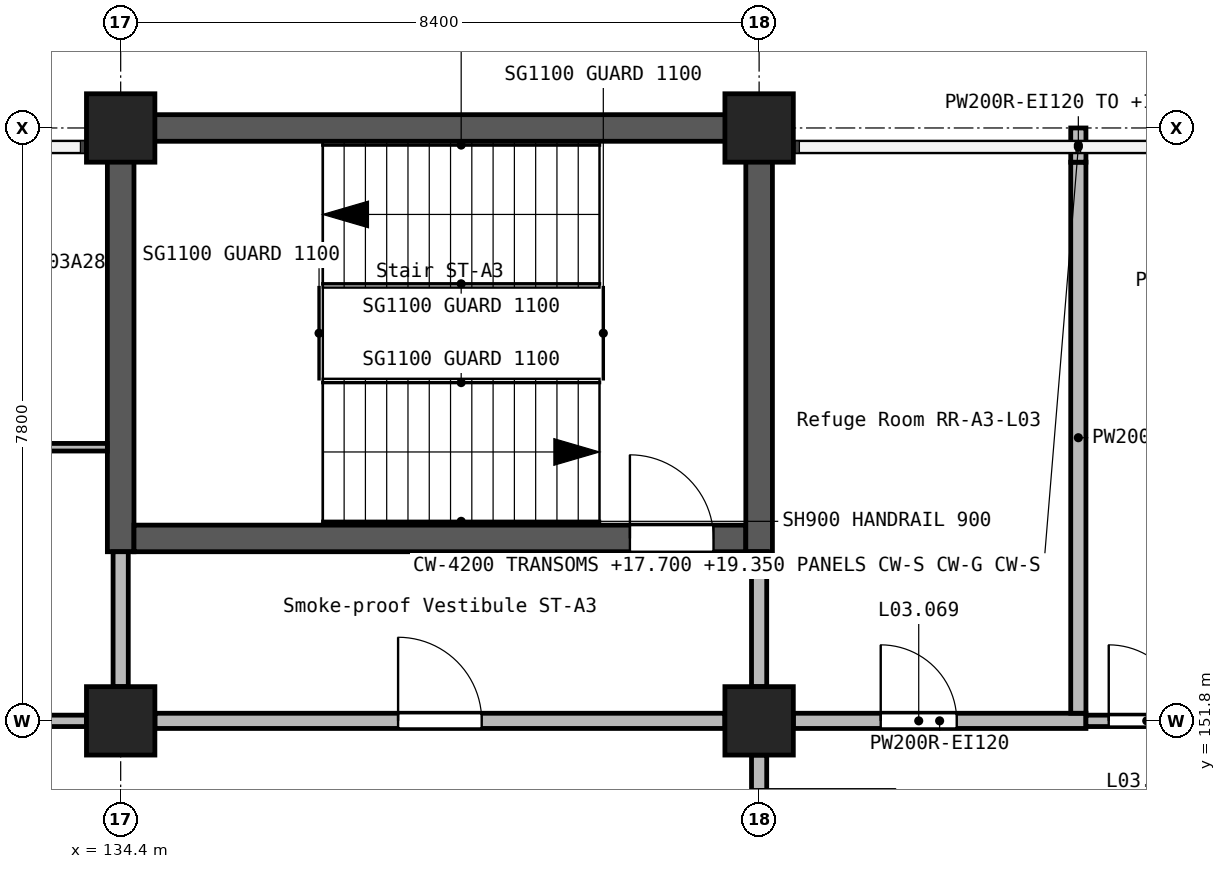
"""IFC4 building model, lengths in metres.
Left out: names, types, materials, properties, quantities, classifications, styles, units other than length and angle.
Written with IfcOpenShell. Run it as: python <this file> out.ifc"""

import sys

from ifc_helpers import new_model, si_unit, direction, frame, frame_2d, origin, origin_2d, place, context, subcontext, project, spatial, rectangle, extrude, element, fill, save


model = new_model("IFC4")
c1 = context("Model", 3, precision=1e-05, world=origin(), true_north=direction((0.0, 1.0)))
c2 = subcontext(c1, "Body", "Model", "MODEL_VIEW")
j1 = project(units=[si_unit("LENGTHUNIT", "METRE"), si_unit("PLANEANGLEUNIT", "RADIAN")], contexts=[c1])
p1 = place(None, origin())
s1 = spatial("IfcSite", under=j1, at=p1, CompositionType="ELEMENT")
p2 = place(p1, origin())
s2 = spatial("IfcBuilding", under=s1, at=p2, CompositionType="ELEMENT")
p3 = place(p2, frame((0.0, 0.0, 16.8)))
s3 = spatial("IfcBuildingStorey", under=s2, at=p3, CompositionType="ELEMENT", Elevation=16.8)
for number, where, z_axis, x_axis in (
    (1, (134.4, 151.8, 0.0), (0.0, 0.0, 1.0), (1.0, 0.0, 0.0)),
    (2, (134.4, 159.6, 0.0), (0.0, 0.0, 1.0), (1.0, 0.0, 0.0)),
    (3, (142.8, 151.8, 0.0), (0.0, 0.0, 1.0), (1.0, 0.0, 0.0)),
    (4, (142.8, 159.6, 0.0), (0.0, 0.0, 1.0), (1.0, 0.0, 0.0)),
):
    element("IfcColumn", number, at=place(p3, frame(where, z_axis=z_axis, x_axis=x_axis)), inside=s3, PredefinedType="COLUMN", context=c2, shape_type="SweptSolid", body=[
        extrude(rectangle(XDim=0.9, YDim=0.9, at=origin_2d()), origin(), (0.0, 0.0, 1.0), 4.2),
    ])
p4 = place(p3, frame((134.225, 159.6, 0.0), z_axis=(0.0, 0.0, 1.0), x_axis=(1.0, 0.0, 0.0)))
e5 = element("IfcWall", 5, at=p4, inside=s3, PredefinedType="SHEAR", context=c2, shape_type="SweptSolid", body=[
    extrude(rectangle(XDim=8.4, YDim=0.35, at=frame_2d((4.2, 0.0))), origin(), (0.0, 0.0, 1.0), 4.2),
])
p5 = place(p3, frame((134.4, 154.025, 0.0), z_axis=(0.0, 0.0, 1.0), x_axis=(0.0, 1.0, 0.0)))
e6 = element("IfcWall", 6, at=p5, inside=s3, PredefinedType="SHEAR", context=c2, shape_type="SweptSolid", body=[
    extrude(rectangle(XDim=5.4, YDim=0.35, at=frame_2d((2.7, 0.0))), origin(), (0.0, 0.0, 1.0), 4.2),
])
p6 = place(p3, frame((134.575, 154.2, 0.0), z_axis=(0.0, 0.0, 1.0), x_axis=(1.0, 0.0, 0.0)))
e7 = element("IfcWall", 7, at=p6, inside=s3, PredefinedType="SHEAR", context=c2, shape_type="SweptSolid", body=[
    extrude(rectangle(XDim=8.05, YDim=0.35, at=frame_2d((4.025, 0.0))), origin(), (0.0, 0.0, 1.0), 4.2),
])
p7 = place(p6, frame((6.525, 0.0, 0.0)))
e8 = element("IfcOpeningElement", 8, at=p7, cuts=e7, PredefinedType="OPENING", context=c2, shape_type="SweptSolid", body=[
    extrude(rectangle(XDim=1.1, YDim=2.1, at=frame_2d((0.55, 1.05))), frame((0.0, 0.185, 0.0), z_axis=(0.0, -1.0, 0.0), x_axis=(1.0, 0.0, 0.0)), (0.0, 0.0, 1.0), 0.37),
])
p8 = place(p3, frame((142.8, 154.025, 0.0), z_axis=(0.0, 0.0, 1.0), x_axis=(0.0, 1.0, 0.0)))
e9 = element("IfcWall", 9, at=p8, inside=s3, PredefinedType="SHEAR", context=c2, shape_type="SweptSolid", body=[
    extrude(rectangle(XDim=5.75, YDim=0.35, at=frame_2d((2.875, 0.0))), origin(), (0.0, 0.0, 1.0), 4.2),
])
p9 = place(p3, frame((142.8, 154.025, 0.0), z_axis=(0.0, 0.0, 1.0), x_axis=(0.0, -1.0, 0.0)))
e10 = element("IfcWall", 10, at=p9, inside=s3, PredefinedType="SOLIDWALL", context=c2, shape_type="SweptSolid", body=[
    extrude(rectangle(XDim=1.775, YDim=0.2, at=frame_2d((0.887, 0.0))), origin(), (0.0, 0.0, 1.0), 3.9),
])
p10 = place(p3, frame((142.8, 151.35, 0.0), z_axis=(0.0, 0.0, 1.0), x_axis=(0.0, -1.0, 0.0)))
e11 = element("IfcWall", 11, at=p10, inside=s3, PredefinedType="SOLIDWALL", context=c2, shape_type="SweptSolid", body=[
    extrude(rectangle(XDim=2.7, YDim=0.2, at=frame_2d((1.35, 0.0))), origin(), (0.0, 0.0, 1.0), 3.9),
])
p11 = place(p10, frame((0.45, 0.0, 0.0)))
e12 = element("IfcOpeningElement", 12, at=p11, cuts=e11, PredefinedType="OPENING", context=c2, shape_type="SweptSolid", body=[
    extrude(rectangle(XDim=1.8, YDim=2.1, at=frame_2d((0.9, 1.05))), frame((0.0, 0.11, 0.0), z_axis=(0.0, -1.0, 0.0), x_axis=(1.0, 0.0, 0.0)), (0.0, 0.0, 1.0), 0.22),
])
p12 = place(p3, frame((134.85, 151.8, 0.0), z_axis=(0.0, 0.0, 1.0), x_axis=(1.0, 0.0, 0.0)))
e13 = element("IfcWall", 13, at=p12, inside=s3, PredefinedType="SOLIDWALL", context=c2, shape_type="SweptSolid", body=[
    extrude(rectangle(XDim=7.5, YDim=0.2, at=frame_2d((3.75, 0.0))), origin(), (0.0, 0.0, 1.0), 3.9),
])
p13 = place(p12, frame((3.2, 0.0, 0.0)))
e14 = element("IfcOpeningElement", 14, at=p13, cuts=e13, PredefinedType="OPENING", context=c2, shape_type="SweptSolid", body=[
    extrude(rectangle(XDim=1.1, YDim=2.1, at=frame_2d((0.55, 1.05))), frame((0.0, 0.11, 0.0), z_axis=(0.0, -1.0, 0.0), x_axis=(1.0, 0.0, 0.0)), (0.0, 0.0, 1.0), 0.22),
])
p14 = place(p3, frame((143.25, 151.8, 0.0), z_axis=(0.0, 0.0, 1.0), x_axis=(1.0, 0.0, 0.0)))
e15 = element("IfcWall", 15, at=p14, inside=s3, PredefinedType="SOLIDWALL", context=c2, shape_type="SweptSolid", body=[
    extrude(rectangle(XDim=3.85, YDim=0.2, at=frame_2d((1.925, 0.0))), origin(), (0.0, 0.0, 1.0), 3.9),
])
p15 = place(p14, frame((1.15, 0.0, 0.0)))
e16 = element("IfcOpeningElement", 16, at=p15, cuts=e15, PredefinedType="OPENING", context=c2, shape_type="SweptSolid", body=[
    extrude(rectangle(XDim=1.0, YDim=2.1, at=frame_2d((0.5, 1.05))), frame((0.0, 0.11, 0.0), z_axis=(0.0, -1.0, 0.0), x_axis=(1.0, 0.0, 0.0)), (0.0, 0.0, 1.0), 0.22),
])
p16 = place(p3, frame((147.0, 151.9, 0.0), z_axis=(0.0, 0.0, 1.0), x_axis=(0.0, 1.0, 0.0)))
e17 = element("IfcWall", 17, at=p16, inside=s3, PredefinedType="SOLIDWALL", context=c2, shape_type="SweptSolid", body=[
    extrude(rectangle(XDim=7.25, YDim=0.2, at=frame_2d((3.625, 0.0))), origin(), (0.0, 0.0, 1.0), 3.9),
])
p17 = place(p3, frame((147.0, 159.15, 0.0), z_axis=(0.0, 0.0, 1.0), x_axis=(0.0, 1.0, 0.0)))
e18 = element("IfcWall", 18, at=p17, inside=s3, PredefinedType="SOLIDWALL", context=c2, shape_type="SweptSolid", body=[
    extrude(rectangle(XDim=0.45, YDim=0.2, at=frame_2d((0.225, 0.0))), origin(), (0.0, 0.0, 1.0), 3.08),
])
p18 = place(p3, frame((134.4, 152.25, 0.0), z_axis=(0.0, 0.0, 1.0), x_axis=(0.0, 1.0, 0.0)))
e19 = element("IfcWall", 19, at=p18, inside=s3, PredefinedType="SOLIDWALL", context=c2, shape_type="SweptSolid", body=[
    extrude(rectangle(XDim=1.775, YDim=0.2, at=frame_2d((0.887, 0.0))), origin(), (0.0, 0.0, 1.0), 3.9),
])
p19 = place(p3, frame((133.95, 151.8, 0.0), z_axis=(0.0, 0.0, 1.0), x_axis=(-1.0, 0.0, 0.0)))
e20 = element("IfcWall", 20, at=p19, inside=s3, PredefinedType="PARTITIONING", context=c2, shape_type="SweptSolid", body=[
    extrude(rectangle(XDim=7.5, YDim=0.15, at=frame_2d((3.75, 0.0))), origin(), (0.0, 0.0, 1.0), 3.9),
])
p20 = place(p19, frame((6.25, 0.0, 0.0)))
e21 = element("IfcOpeningElement", 21, at=p20, cuts=e20, PredefinedType="OPENING", context=c2, shape_type="SweptSolid", body=[
    extrude(rectangle(XDim=1.0, YDim=2.1, at=frame_2d((0.5, 1.05))), frame((0.0, 0.085, 0.0), z_axis=(0.0, -1.0, 0.0), x_axis=(1.0, 0.0, 0.0)), (0.0, 0.0, 1.0), 0.17),
])
p21 = place(p19, frame((2.25, 0.0, 0.0)))
e22 = element("IfcOpeningElement", 22, at=p21, cuts=e20, PredefinedType="OPENING", context=c2, shape_type="SweptSolid", body=[
    extrude(rectangle(XDim=0.9, YDim=2.1, at=frame_2d((0.45, 1.05))), frame((0.0, 0.085, 0.0), z_axis=(0.0, -1.0, 0.0), x_axis=(1.0, 0.0, 0.0)), (0.0, 0.0, 1.0), 0.17),
])
p22 = place(p3, frame((147.1, 151.8, 0.0), z_axis=(0.0, 0.0, 1.0), x_axis=(1.0, 0.0, 0.0)))
e23 = element("IfcWall", 23, at=p22, inside=s3, PredefinedType="PARTITIONING", context=c2, shape_type="SweptSolid", body=[
    extrude(rectangle(XDim=3.65, YDim=0.15, at=frame_2d((1.825, 0.0))), origin(), (0.0, 0.0, 1.0), 3.9),
])
p23 = place(p22, frame((0.3, 0.0, 0.0)))
e24 = element("IfcOpeningElement", 24, at=p23, cuts=e23, PredefinedType="OPENING", context=c2, shape_type="SweptSolid", body=[
    extrude(rectangle(XDim=1.0, YDim=2.1, at=frame_2d((0.5, 1.05))), frame((0.0, 0.085, 0.0), z_axis=(0.0, -1.0, 0.0), x_axis=(1.0, 0.0, 0.0)), (0.0, 0.0, 1.0), 0.17),
])
p24 = place(p3, frame((128.175, 155.4, 0.0), z_axis=(0.0, 0.0, 1.0), x_axis=(1.0, 0.0, 0.0)))
e25 = element("IfcWall", 25, at=p24, inside=s3, PredefinedType="PARTITIONING", context=c2, shape_type="SweptSolid", body=[
    extrude(rectangle(XDim=6.05, YDim=0.1, at=frame_2d((3.025, 0.0))), origin(), (0.0, 0.0, 1.0), 3.9),
])
p25 = place(p24, frame((1.0, 0.0, 0.0)))
e26 = element("IfcOpeningElement", 26, at=p25, cuts=e25, PredefinedType="OPENING", context=c2, shape_type="SweptSolid", body=[
    extrude(rectangle(XDim=1.0, YDim=2.1, at=frame_2d((0.5, 1.05))), frame((0.0, 0.06, 0.0), z_axis=(0.0, -1.0, 0.0), x_axis=(1.0, 0.0, 0.0)), (0.0, 0.0, 1.0), 0.12),
])
p26 = place(p24, frame((4.2, 0.0, 0.0)))
e27 = element("IfcOpeningElement", 27, at=p26, cuts=e25, PredefinedType="OPENING", context=c2, shape_type="SweptSolid", body=[
    extrude(rectangle(XDim=0.9, YDim=2.1, at=frame_2d((0.45, 1.05))), frame((0.0, 0.06, 0.0), z_axis=(0.0, -1.0, 0.0), x_axis=(1.0, 0.0, 0.0)), (0.0, 0.0, 1.0), 0.12),
])
p27 = place(p11, origin())
e28 = element("IfcDoor", 28, at=p27, inside=s3, OperationType="DOUBLE_DOOR_SINGLE_SWING", PredefinedType="DOOR", context=c2, shape_type="SweptSolid", body=[
    extrude(rectangle(XDim=1.8, YDim=2.1, at=frame_2d((0.9, 1.05))), frame((0.0, 0.025, 0.0), z_axis=(0.0, -1.0, 0.0), x_axis=(1.0, 0.0, 0.0)), (0.0, 0.0, 1.0), 0.05),
])
fill(e12, e28)
p28 = place(p23, origin())
e29 = element("IfcDoor", 29, at=p28, inside=s3, OperationType="SINGLE_SWING_LEFT", PredefinedType="DOOR", context=c2, shape_type="SweptSolid", body=[
    extrude(rectangle(XDim=1.0, YDim=2.1, at=frame_2d((0.5, 1.05))), frame((0.0, 0.025, 0.0), z_axis=(0.0, -1.0, 0.0), x_axis=(1.0, 0.0, 0.0)), (0.0, 0.0, 1.0), 0.05),
])
fill(e24, e29)
p29 = place(p15, origin())
e30 = element("IfcDoor", 30, at=p29, inside=s3, OperationType="SINGLE_SWING_LEFT", PredefinedType="DOOR", context=c2, shape_type="SweptSolid", body=[
    extrude(rectangle(XDim=1.0, YDim=2.1, at=frame_2d((0.5, 1.05))), frame((0.0, 0.025, 0.0), z_axis=(0.0, -1.0, 0.0), x_axis=(1.0, 0.0, 0.0)), (0.0, 0.0, 1.0), 0.05),
])
fill(e16, e30)
p30 = place(p7, origin())
e31 = element("IfcDoor", 31, at=p30, inside=s3, OperationType="SINGLE_SWING_RIGHT", PredefinedType="DOOR", context=c2, shape_type="SweptSolid", body=[
    extrude(rectangle(XDim=1.1, YDim=2.1, at=frame_2d((0.55, 1.05))), frame((0.0, 0.025, 0.0), z_axis=(0.0, -1.0, 0.0), x_axis=(1.0, 0.0, 0.0)), (0.0, 0.0, 1.0), 0.05),
])
fill(e8, e31)
p31 = place(p13, origin())
e32 = element("IfcDoor", 32, at=p31, inside=s3, OperationType="SINGLE_SWING_RIGHT", PredefinedType="DOOR", context=c2, shape_type="SweptSolid", body=[
    extrude(rectangle(XDim=1.1, YDim=2.1, at=frame_2d((0.55, 1.05))), frame((0.0, 0.025, 0.0), z_axis=(0.0, -1.0, 0.0), x_axis=(1.0, 0.0, 0.0)), (0.0, 0.0, 1.0), 0.05),
])
fill(e14, e32)
save(model, sys.argv[1])
